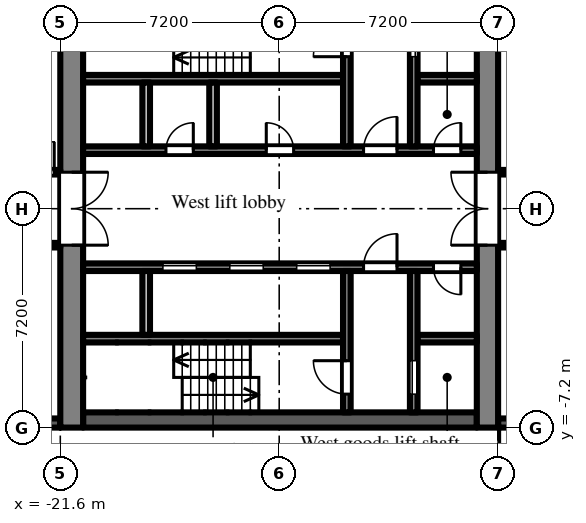
"""IFC4 building model, lengths in metres.
Left out: names, types, materials, properties, quantities, classifications, styles, units other than length and angle.
Written with IfcOpenShell. Run it as: python <this file> out.ifc"""

import sys

from ifc_helpers import new_model, si_unit, direction, frame, frame_2d, origin, place, context, subcontext, project, spatial, rectangle, extrude, element, fill, save


model = new_model("IFC4")
c1 = context("Model", 3, precision=1e-05, world=origin(), true_north=direction((0.0, 1.0)))
c2 = subcontext(c1, "Body", "Model", "MODEL_VIEW")
j1 = project(units=[si_unit("LENGTHUNIT", "METRE"), si_unit("PLANEANGLEUNIT", "RADIAN")], contexts=[c1])
p1 = place(None, origin())
s1 = spatial("IfcSite", under=j1, at=p1, CompositionType="ELEMENT")
p2 = place(p1, origin())
s2 = spatial("IfcBuilding", under=s1, at=p2, CompositionType="ELEMENT")
p3 = place(p2, frame((0.0, 0.0, 59.7)))
s3 = spatial("IfcBuildingStorey", under=s2, at=p3, CompositionType="ELEMENT", Elevation=59.7)
p4 = place(p3, frame((-24.3, -7.05, 0.0), z_axis=(0.0, 0.0, 1.0), x_axis=(1.0, 0.0, 0.0)))
e1 = element("IfcWall", 1, at=p4, inside=s3, PredefinedType="SOLIDWALL", context=c2, shape_type="SweptSolid", body=[
    extrude(rectangle(XDim=2.7, YDim=0.3, at=frame_2d((1.35, 0.0))), origin(), (0.0, 0.0, 1.0), 2.1),
])
p5 = place(p3, frame((-7.2, -7.05, 0.0), z_axis=(0.0, 0.0, 1.0), x_axis=(1.0, 0.0, 0.0)))
e2 = element("IfcWall", 2, at=p5, inside=s3, PredefinedType="SOLIDWALL", context=c2, shape_type="SweptSolid", body=[
    extrude(rectangle(XDim=3.0, YDim=0.3, at=frame_2d((1.5, 0.0))), origin(), (0.0, 0.0, 1.0), 2.55),
])
p6 = place(p3, frame((-7.55, -7.2, 0.0), z_axis=(0.0, 0.0, 1.0), x_axis=(0.0, 1.0, 0.0)))
e3 = element("IfcWall", 3, at=p6, inside=s3, PredefinedType="SHEAR", context=c2, shape_type="SweptSolid", body=[
    extrude(rectangle(XDim=14.4, YDim=0.7, at=frame_2d((7.2, 0.0))), origin(), (0.0, 0.0, 1.0), 2.55),
])
p7 = place(p6, frame((6.0, 0.0, 0.0)))
e4 = element("IfcOpeningElement", 4, at=p7, cuts=e3, PredefinedType="OPENING", context=c2, shape_type="SweptSolid", body=[
    extrude(rectangle(XDim=2.4, YDim=2.2, at=frame_2d((1.2, 1.1))), frame((0.0, 0.36, 0.0), z_axis=(0.0, -1.0, 0.0), x_axis=(1.0, 0.0, 0.0)), (0.0, 0.0, 1.0), 0.72),
])
p8 = place(p3, frame((-21.225, -7.2, 0.0), z_axis=(0.0, 0.0, 1.0), x_axis=(0.0, 1.0, 0.0)))
e5 = element("IfcWall", 5, at=p8, inside=s3, PredefinedType="SHEAR", context=c2, shape_type="SweptSolid", body=[
    extrude(rectangle(XDim=14.4, YDim=0.75, at=frame_2d((7.2, 0.0))), origin(), (0.0, 0.0, 1.0), 2.55),
])
p9 = place(p8, frame((6.0, 0.0, 0.0)))
e6 = element("IfcOpeningElement", 6, at=p9, cuts=e5, PredefinedType="OPENING", context=c2, shape_type="SweptSolid", body=[
    extrude(rectangle(XDim=2.4, YDim=2.2, at=frame_2d((1.2, 1.1))), frame((0.0, 0.385, 0.0), z_axis=(0.0, -1.0, 0.0), x_axis=(1.0, 0.0, 0.0)), (0.0, 0.0, 1.0), 0.77),
])
p10 = place(p3, frame((-7.9, 1.925, 0.0), z_axis=(0.0, 0.0, 1.0), x_axis=(-1.0, 0.0, 0.0)))
e7 = element("IfcWall", 7, at=p10, inside=s3, PredefinedType="SHEAR", context=c2, shape_type="SweptSolid", body=[
    extrude(rectangle(XDim=12.95, YDim=0.25, at=frame_2d((6.475, 0.0))), origin(), (0.0, 0.0, 1.0), 2.55),
])
p11 = place(p10, frame((0.525, 0.0, 0.0)))
e8 = element("IfcOpeningElement", 8, at=p11, cuts=e7, PredefinedType="OPENING", context=c2, shape_type="SweptSolid", body=[
    extrude(rectangle(XDim=0.9, YDim=2.1, at=frame_2d((0.45, 1.05))), frame((0.0, 0.135, 0.0), z_axis=(0.0, -1.0, 0.0), x_axis=(1.0, 0.0, 0.0)), (0.0, 0.0, 1.0), 0.27),
])
p12 = place(p10, frame((2.625, 0.0, 0.0)))
e9 = element("IfcOpeningElement", 9, at=p12, cuts=e7, PredefinedType="OPENING", context=c2, shape_type="SweptSolid", body=[
    extrude(rectangle(XDim=1.1, YDim=2.1, at=frame_2d((0.55, 1.05))), frame((0.0, 0.135, 0.0), z_axis=(0.0, -1.0, 0.0), x_axis=(1.0, 0.0, 0.0)), (0.0, 0.0, 1.0), 0.27),
])
p13 = place(p10, frame((6.025, 0.0, 0.0)))
e10 = element("IfcOpeningElement", 10, at=p13, cuts=e7, PredefinedType="OPENING", context=c2, shape_type="SweptSolid", body=[
    extrude(rectangle(XDim=0.9, YDim=2.1, at=frame_2d((0.45, 1.05))), frame((0.0, 0.135, 0.0), z_axis=(0.0, -1.0, 0.0), x_axis=(1.0, 0.0, 0.0)), (0.0, 0.0, 1.0), 0.27),
])
p14 = place(p10, frame((9.325, 0.0, 0.0)))
e11 = element("IfcOpeningElement", 11, at=p14, cuts=e7, PredefinedType="OPENING", context=c2, shape_type="SweptSolid", body=[
    extrude(rectangle(XDim=0.9, YDim=2.1, at=frame_2d((0.45, 1.05))), frame((0.0, 0.135, 0.0), z_axis=(0.0, -1.0, 0.0), x_axis=(1.0, 0.0, 0.0)), (0.0, 0.0, 1.0), 0.27),
])
p15 = place(p3, frame((-7.9, 4.275, 0.0), z_axis=(0.0, 0.0, 1.0), x_axis=(-1.0, 0.0, 0.0)))
e12 = element("IfcWall", 12, at=p15, inside=s3, PredefinedType="SHEAR", context=c2, shape_type="SweptSolid", body=[
    extrude(rectangle(XDim=1.95, YDim=0.25, at=frame_2d((0.975, 0.0))), origin(), (0.0, 0.0, 1.0), 2.55),
])
p16 = place(p3, frame((-12.3, 4.275, 0.0), z_axis=(0.0, 0.0, 1.0), x_axis=(-1.0, 0.0, 0.0)))
e13 = element("IfcWall", 13, at=p16, inside=s3, PredefinedType="SHEAR", context=c2, shape_type="SweptSolid", body=[
    extrude(rectangle(XDim=8.55, YDim=0.25, at=frame_2d((4.275, 0.0))), origin(), (0.0, 0.0, 1.0), 2.55),
])
p17 = place(p3, frame((-9.975, 2.05, 0.0), z_axis=(0.0, 0.0, 1.0), x_axis=(0.0, 1.0, 0.0)))
e14 = element("IfcWall", 14, at=p17, inside=s3, PredefinedType="SHEAR", context=c2, shape_type="SweptSolid", body=[
    extrude(rectangle(XDim=4.65, YDim=0.25, at=frame_2d((2.325, 0.0))), origin(), (0.0, 0.0, 1.0), 2.55),
])
p18 = place(p17, frame((2.95, 0.0, 0.0)))
e15 = element("IfcOpeningElement", 15, at=p18, cuts=e14, PredefinedType="OPENING", context=c2, shape_type="SweptSolid", body=[
    extrude(rectangle(XDim=1.1, YDim=2.1, at=frame_2d((0.55, 1.05))), frame((0.0, 0.135, 0.0), z_axis=(0.0, -1.0, 0.0), x_axis=(1.0, 0.0, 0.0)), (0.0, 0.0, 1.0), 0.27),
])
p19 = place(p3, frame((-12.175, 2.05, 0.0), z_axis=(0.0, 0.0, 1.0), x_axis=(0.0, 1.0, 0.0)))
e16 = element("IfcWall", 16, at=p19, inside=s3, PredefinedType="SHEAR", context=c2, shape_type="SweptSolid", body=[
    extrude(rectangle(XDim=4.65, YDim=0.25, at=frame_2d((2.325, 0.0))), origin(), (0.0, 0.0, 1.0), 2.55),
])
p20 = place(p19, frame((2.95, 0.0, 0.0)))
e17 = element("IfcOpeningElement", 17, at=p20, cuts=e16, PredefinedType="OPENING", context=c2, shape_type="SweptSolid", body=[
    extrude(rectangle(XDim=1.1, YDim=2.1, at=frame_2d((0.55, 1.05))), frame((0.0, 0.135, 0.0), z_axis=(0.0, -1.0, 0.0), x_axis=(1.0, 0.0, 0.0)), (0.0, 0.0, 1.0), 0.27),
])
for number, where, z_axis, x_axis in (
    (18, (-16.575, 2.05, 0.0), (0.0, 0.0, 1.0), (0.0, 1.0, 0.0)),
    (19, (-18.775, 2.05, 0.0), (0.0, 0.0, 1.0), (0.0, 1.0, 0.0)),
):
    element("IfcWall", number, at=place(p3, frame(where, z_axis=z_axis, x_axis=x_axis)), inside=s3, PredefinedType="PARTITIONING", context=c2, shape_type="SweptSolid", body=[
        extrude(rectangle(XDim=2.1, YDim=0.25, at=frame_2d((1.05, 0.0))), origin(), (0.0, 0.0, 1.0), 2.55),
    ])
p21 = place(p3, frame((-7.9, -6.95, 0.0), z_axis=(0.0, 0.0, 1.0), x_axis=(-1.0, 0.0, 0.0)))
e20 = element("IfcWall", 20, at=p21, inside=s3, PredefinedType="SHEAR", context=c2, shape_type="SweptSolid", body=[
    extrude(rectangle(XDim=12.95, YDim=0.5, at=frame_2d((6.475, 0.0))), origin(), (0.0, 0.0, 1.0), 2.55),
])
p22 = place(p3, frame((-7.9, -1.925, 0.0), z_axis=(0.0, 0.0, 1.0), x_axis=(-1.0, 0.0, 0.0)))
e21 = element("IfcWall", 21, at=p22, inside=s3, PredefinedType="SHEAR", context=c2, shape_type="SweptSolid", body=[
    extrude(rectangle(XDim=12.95, YDim=0.25, at=frame_2d((6.475, 0.0))), origin(), (0.0, 0.0, 1.0), 2.55),
])
p23 = place(p22, frame((4.825, 0.0, 0.0)))
e22 = element("IfcOpeningElement", 22, at=p23, cuts=e21, PredefinedType="OPENING", context=c2, shape_type="SweptSolid", body=[
    extrude(rectangle(XDim=1.1, YDim=2.1, at=frame_2d((0.55, 1.05))), frame((0.0, 0.135, 0.0), z_axis=(0.0, -1.0, 0.0), x_axis=(1.0, 0.0, 0.0)), (0.0, 0.0, 1.0), 0.27),
])
p24 = place(p22, frame((7.025, 0.0, 0.0)))
e23 = element("IfcOpeningElement", 23, at=p24, cuts=e21, PredefinedType="OPENING", context=c2, shape_type="SweptSolid", body=[
    extrude(rectangle(XDim=1.1, YDim=2.1, at=frame_2d((0.55, 1.05))), frame((0.0, 0.135, 0.0), z_axis=(0.0, -1.0, 0.0), x_axis=(1.0, 0.0, 0.0)), (0.0, 0.0, 1.0), 0.27),
])
p25 = place(p22, frame((9.225, 0.0, 0.0)))
e24 = element("IfcOpeningElement", 24, at=p25, cuts=e21, PredefinedType="OPENING", context=c2, shape_type="SweptSolid", body=[
    extrude(rectangle(XDim=1.1, YDim=2.1, at=frame_2d((0.55, 1.05))), frame((0.0, 0.135, 0.0), z_axis=(0.0, -1.0, 0.0), x_axis=(1.0, 0.0, 0.0)), (0.0, 0.0, 1.0), 0.27),
])
p26 = place(p22, frame((0.525, 0.0, 0.0)))
e25 = element("IfcOpeningElement", 25, at=p26, cuts=e21, PredefinedType="OPENING", context=c2, shape_type="SweptSolid", body=[
    extrude(rectangle(XDim=0.9, YDim=2.1, at=frame_2d((0.45, 1.05))), frame((0.0, 0.135, 0.0), z_axis=(0.0, -1.0, 0.0), x_axis=(1.0, 0.0, 0.0)), (0.0, 0.0, 1.0), 0.27),
])
p27 = place(p22, frame((2.625, 0.0, 0.0)))
e26 = element("IfcOpeningElement", 26, at=p27, cuts=e21, PredefinedType="OPENING", context=c2, shape_type="SweptSolid", body=[
    extrude(rectangle(XDim=1.1, YDim=2.1, at=frame_2d((0.55, 1.05))), frame((0.0, 0.135, 0.0), z_axis=(0.0, -1.0, 0.0), x_axis=(1.0, 0.0, 0.0)), (0.0, 0.0, 1.0), 0.27),
])
p28 = place(p3, frame((-7.9, -4.275, 0.0), z_axis=(0.0, 0.0, 1.0), x_axis=(-1.0, 0.0, 0.0)))
e27 = element("IfcWall", 27, at=p28, inside=s3, PredefinedType="SHEAR", context=c2, shape_type="SweptSolid", body=[
    extrude(rectangle(XDim=1.95, YDim=0.25, at=frame_2d((0.975, 0.0))), origin(), (0.0, 0.0, 1.0), 2.55),
])
p29 = place(p3, frame((-12.3, -4.275, 0.0), z_axis=(0.0, 0.0, 1.0), x_axis=(-1.0, 0.0, 0.0)))
e28 = element("IfcWall", 28, at=p29, inside=s3, PredefinedType="SHEAR", context=c2, shape_type="SweptSolid", body=[
    extrude(rectangle(XDim=8.55, YDim=0.25, at=frame_2d((4.275, 0.0))), origin(), (0.0, 0.0, 1.0), 2.55),
])
p30 = place(p3, frame((-9.975, -2.05, 0.0), z_axis=(0.0, 0.0, 1.0), x_axis=(0.0, -1.0, 0.0)))
e29 = element("IfcWall", 29, at=p30, inside=s3, PredefinedType="SHEAR", context=c2, shape_type="SweptSolid", body=[
    extrude(rectangle(XDim=4.65, YDim=0.25, at=frame_2d((2.325, 0.0))), origin(), (0.0, 0.0, 1.0), 2.55),
])
p31 = place(p30, frame((2.95, 0.0, 0.0)))
e30 = element("IfcOpeningElement", 30, at=p31, cuts=e29, PredefinedType="OPENING", context=c2, shape_type="SweptSolid", body=[
    extrude(rectangle(XDim=1.1, YDim=2.1, at=frame_2d((0.55, 1.05))), frame((0.0, 0.135, 0.0), z_axis=(0.0, -1.0, 0.0), x_axis=(1.0, 0.0, 0.0)), (0.0, 0.0, 1.0), 0.27),
])
p32 = place(p3, frame((-12.175, -2.05, 0.0), z_axis=(0.0, 0.0, 1.0), x_axis=(0.0, -1.0, 0.0)))
e31 = element("IfcWall", 31, at=p32, inside=s3, PredefinedType="SHEAR", context=c2, shape_type="SweptSolid", body=[
    extrude(rectangle(XDim=4.65, YDim=0.25, at=frame_2d((2.325, 0.0))), origin(), (0.0, 0.0, 1.0), 2.55),
])
p33 = place(p32, frame((2.95, 0.0, 0.0)))
e32 = element("IfcOpeningElement", 32, at=p33, cuts=e31, PredefinedType="OPENING", context=c2, shape_type="SweptSolid", body=[
    extrude(rectangle(XDim=1.1, YDim=2.1, at=frame_2d((0.55, 1.05))), frame((0.0, 0.135, 0.0), z_axis=(0.0, -1.0, 0.0), x_axis=(1.0, 0.0, 0.0)), (0.0, 0.0, 1.0), 0.27),
])
p34 = place(p3, frame((-18.775, -2.05, 0.0), z_axis=(0.0, 0.0, 1.0), x_axis=(0.0, -1.0, 0.0)))
e33 = element("IfcWall", 33, at=p34, inside=s3, PredefinedType="PARTITIONING", context=c2, shape_type="SweptSolid", body=[
    extrude(rectangle(XDim=2.1, YDim=0.25, at=frame_2d((1.05, 0.0))), origin(), (0.0, 0.0, 1.0), 2.55),
])
p35 = place(p3, frame((-36.5, -1.2, 0.0), z_axis=(0.0, 0.0, 1.0), x_axis=(1.0, 0.0, 0.0)))
e34 = element("IfcWall", 34, at=p35, inside=s3, PredefinedType="PARTITIONING", context=c2, shape_type="SweptSolid", body=[
    extrude(rectangle(XDim=14.9, YDim=0.15, at=frame_2d((7.45, 0.0))), origin(), (0.0, 0.0, 1.0), 2.55),
])
p36 = place(p35, frame((10.4, 0.0, 0.0)))
e35 = element("IfcOpeningElement", 35, at=p36, cuts=e34, PredefinedType="OPENING", context=c2, shape_type="SweptSolid", body=[
    extrude(rectangle(XDim=1.8, YDim=2.1, at=frame_2d((0.9, 1.05))), frame((0.0, 0.085, 0.0), z_axis=(0.0, -1.0, 0.0), x_axis=(1.0, 0.0, 0.0)), (0.0, 0.0, 1.0), 0.17),
])
p37 = place(p35, frame((6.35, 0.0, 0.0)))
e36 = element("IfcOpeningElement", 36, at=p37, cuts=e34, PredefinedType="OPENING", context=c2, shape_type="SweptSolid", body=[
    extrude(rectangle(XDim=0.9, YDim=2.1, at=frame_2d((0.45, 1.05))), frame((0.0, 0.085, 0.0), z_axis=(0.0, -1.0, 0.0), x_axis=(1.0, 0.0, 0.0)), (0.0, 0.0, 1.0), 0.17),
])
p38 = place(p35, frame((4.55, 0.0, 0.0)))
e37 = element("IfcOpeningElement", 37, at=p38, cuts=e34, PredefinedType="OPENING", context=c2, shape_type="SweptSolid", body=[
    extrude(rectangle(XDim=0.9, YDim=2.1, at=frame_2d((0.45, 1.05))), frame((0.0, 0.085, 0.0), z_axis=(0.0, -1.0, 0.0), x_axis=(1.0, 0.0, 0.0)), (0.0, 0.0, 1.0), 0.17),
])
p39 = place(p35, frame((1.15, 0.0, 0.0)))
e38 = element("IfcOpeningElement", 38, at=p39, cuts=e34, PredefinedType="OPENING", context=c2, shape_type="SweptSolid", body=[
    extrude(rectangle(XDim=1.8, YDim=2.1, at=frame_2d((0.9, 1.05))), frame((0.0, 0.085, 0.0), z_axis=(0.0, -1.0, 0.0), x_axis=(1.0, 0.0, 0.0)), (0.0, 0.0, 1.0), 0.17),
])
p40 = place(p3, frame((-36.5, 1.2, 0.0), z_axis=(0.0, 0.0, 1.0), x_axis=(1.0, 0.0, 0.0)))
e39 = element("IfcWall", 39, at=p40, inside=s3, PredefinedType="PARTITIONING", context=c2, shape_type="SweptSolid", body=[
    extrude(rectangle(XDim=14.9, YDim=0.15, at=frame_2d((7.45, 0.0))), origin(), (0.0, 0.0, 1.0), 2.55),
])
p41 = place(p40, frame((13.7, 0.0, 0.0)))
e40 = element("IfcOpeningElement", 40, at=p41, cuts=e39, PredefinedType="OPENING", context=c2, shape_type="SweptSolid", body=[
    extrude(rectangle(XDim=1.0, YDim=2.1, at=frame_2d((0.5, 1.05))), frame((0.0, 0.085, 0.0), z_axis=(0.0, -1.0, 0.0), x_axis=(1.0, 0.0, 0.0)), (0.0, 0.0, 1.0), 0.17),
])
p42 = place(p40, frame((8.19, 0.0, 0.0)))
e41 = element("IfcOpeningElement", 41, at=p42, cuts=e39, PredefinedType="OPENING", context=c2, shape_type="SweptSolid", body=[
    extrude(rectangle(XDim=1.0, YDim=2.1, at=frame_2d((0.5, 1.05))), frame((0.0, 0.085, 0.0), z_axis=(0.0, -1.0, 0.0), x_axis=(1.0, 0.0, 0.0)), (0.0, 0.0, 1.0), 0.17),
])
p43 = place(p40, frame((1.15, 0.0, 0.0)))
e42 = element("IfcOpeningElement", 42, at=p43, cuts=e39, PredefinedType="OPENING", context=c2, shape_type="SweptSolid", body=[
    extrude(rectangle(XDim=1.8, YDim=2.1, at=frame_2d((0.9, 1.05))), frame((0.0, 0.085, 0.0), z_axis=(0.0, -1.0, 0.0), x_axis=(1.0, 0.0, 0.0)), (0.0, 0.0, 1.0), 0.17),
])
p44 = place(p3, frame((-7.2, -1.2, 0.0), z_axis=(0.0, 0.0, 1.0), x_axis=(1.0, 0.0, 0.0)))
e43 = element("IfcWall", 43, at=p44, inside=s3, PredefinedType="PARTITIONING", context=c2, shape_type="SweptSolid", body=[
    extrude(rectangle(XDim=6.075, YDim=0.15, at=frame_2d((3.038, 0.0))), origin(), (0.0, 0.0, 1.0), 2.55),
])
p45 = place(p44, frame((2.55, 0.0, 0.0)))
e44 = element("IfcOpeningElement", 44, at=p45, cuts=e43, PredefinedType="OPENING", context=c2, shape_type="SweptSolid", body=[
    extrude(rectangle(XDim=0.9, YDim=2.1, at=frame_2d((0.45, 1.05))), frame((0.0, 0.085, 0.0), z_axis=(0.0, -1.0, 0.0), x_axis=(1.0, 0.0, 0.0)), (0.0, 0.0, 1.0), 0.17),
])
p46 = place(p44, frame((0.55, 0.0, 0.0)))
e45 = element("IfcOpeningElement", 45, at=p46, cuts=e43, PredefinedType="OPENING", context=c2, shape_type="SweptSolid", body=[
    extrude(rectangle(XDim=0.9, YDim=2.1, at=frame_2d((0.45, 1.05))), frame((0.0, 0.085, 0.0), z_axis=(0.0, -1.0, 0.0), x_axis=(1.0, 0.0, 0.0)), (0.0, 0.0, 1.0), 0.17),
])
p47 = place(p3, frame((-7.2, 1.2, 0.0), z_axis=(0.0, 0.0, 1.0), x_axis=(1.0, 0.0, 0.0)))
e46 = element("IfcWall", 46, at=p47, inside=s3, PredefinedType="PARTITIONING", context=c2, shape_type="SweptSolid", body=[
    extrude(rectangle(XDim=6.075, YDim=0.15, at=frame_2d((3.038, 0.0))), origin(), (0.0, 0.0, 1.0), 2.55),
])
p48 = place(p47, frame((2.55, 0.0, 0.0)))
e47 = element("IfcOpeningElement", 47, at=p48, cuts=e46, PredefinedType="OPENING", context=c2, shape_type="SweptSolid", body=[
    extrude(rectangle(XDim=0.9, YDim=2.1, at=frame_2d((0.45, 1.05))), frame((0.0, 0.085, 0.0), z_axis=(0.0, -1.0, 0.0), x_axis=(1.0, 0.0, 0.0)), (0.0, 0.0, 1.0), 0.17),
])
p49 = place(p47, frame((0.55, 0.0, 0.0)))
e48 = element("IfcOpeningElement", 48, at=p49, cuts=e46, PredefinedType="OPENING", context=c2, shape_type="SweptSolid", body=[
    extrude(rectangle(XDim=0.9, YDim=2.1, at=frame_2d((0.45, 1.05))), frame((0.0, 0.085, 0.0), z_axis=(0.0, -1.0, 0.0), x_axis=(1.0, 0.0, 0.0)), (0.0, 0.0, 1.0), 0.17),
])
p50 = place(p23, origin())
e49 = element("IfcDoor", 49, at=p50, inside=s3, OperationType="SLIDING_TO_LEFT", PredefinedType="DOOR", context=c2, shape_type="SweptSolid", body=[
    extrude(rectangle(XDim=1.1, YDim=2.1, at=frame_2d((0.55, 1.05))), frame((0.0, 0.025, 0.0), z_axis=(0.0, -1.0, 0.0), x_axis=(1.0, 0.0, 0.0)), (0.0, 0.0, 1.0), 0.05),
])
fill(e22, e49)
p51 = place(p24, origin())
e50 = element("IfcDoor", 50, at=p51, inside=s3, OperationType="SLIDING_TO_LEFT", PredefinedType="DOOR", context=c2, shape_type="SweptSolid", body=[
    extrude(rectangle(XDim=1.1, YDim=2.1, at=frame_2d((0.55, 1.05))), frame((0.0, 0.025, 0.0), z_axis=(0.0, -1.0, 0.0), x_axis=(1.0, 0.0, 0.0)), (0.0, 0.0, 1.0), 0.05),
])
fill(e23, e50)
p52 = place(p25, origin())
e51 = element("IfcDoor", 51, at=p52, inside=s3, OperationType="SLIDING_TO_LEFT", PredefinedType="DOOR", context=c2, shape_type="SweptSolid", body=[
    extrude(rectangle(XDim=1.1, YDim=2.1, at=frame_2d((0.55, 1.05))), frame((0.0, 0.025, 0.0), z_axis=(0.0, -1.0, 0.0), x_axis=(1.0, 0.0, 0.0)), (0.0, 0.0, 1.0), 0.05),
])
fill(e24, e51)
p53 = place(p18, origin())
e52 = element("IfcDoor", 52, at=p53, inside=s3, OperationType="SLIDING_TO_LEFT", PredefinedType="DOOR", context=c2, shape_type="SweptSolid", body=[
    extrude(rectangle(XDim=1.1, YDim=2.1, at=frame_2d((0.55, 1.05))), frame((0.0, 0.025, 0.0), z_axis=(0.0, -1.0, 0.0), x_axis=(1.0, 0.0, 0.0)), (0.0, 0.0, 1.0), 0.05),
])
fill(e15, e52)
p54 = place(p31, origin())
e53 = element("IfcDoor", 53, at=p54, inside=s3, OperationType="SLIDING_TO_LEFT", PredefinedType="DOOR", context=c2, shape_type="SweptSolid", body=[
    extrude(rectangle(XDim=1.1, YDim=2.1, at=frame_2d((0.55, 1.05))), frame((0.0, 0.025, 0.0), z_axis=(0.0, -1.0, 0.0), x_axis=(1.0, 0.0, 0.0)), (0.0, 0.0, 1.0), 0.05),
])
fill(e30, e53)
p55 = place(p20, origin())
e54 = element("IfcDoor", 54, at=p55, inside=s3, OperationType="SINGLE_SWING_LEFT", PredefinedType="DOOR", context=c2, shape_type="SweptSolid", body=[
    extrude(rectangle(XDim=1.1, YDim=2.1, at=frame_2d((0.55, 1.05))), frame((0.0, 0.025, 0.0), z_axis=(0.0, -1.0, 0.0), x_axis=(1.0, 0.0, 0.0)), (0.0, 0.0, 1.0), 0.05),
])
fill(e17, e54)
p56 = place(p33, frame((1.1, 0.0, 0.0), z_axis=(0.0, 0.0, 1.0), x_axis=(-1.0, 0.0, 0.0)))
e55 = element("IfcDoor", 55, at=p56, inside=s3, OperationType="SINGLE_SWING_RIGHT", PredefinedType="DOOR", context=c2, shape_type="SweptSolid", body=[
    extrude(rectangle(XDim=1.1, YDim=2.1, at=frame_2d((0.55, 1.05))), frame((0.0, 0.025, 0.0), z_axis=(0.0, -1.0, 0.0), x_axis=(1.0, 0.0, 0.0)), (0.0, 0.0, 1.0), 0.05),
])
fill(e32, e55)
p57 = place(p11, frame((0.9, 0.0, 0.0), z_axis=(0.0, 0.0, 1.0), x_axis=(-1.0, 0.0, 0.0)))
e56 = element("IfcDoor", 56, at=p57, inside=s3, OperationType="SINGLE_SWING_RIGHT", PredefinedType="DOOR", context=c2, shape_type="SweptSolid", body=[
    extrude(rectangle(XDim=0.9, YDim=2.1, at=frame_2d((0.45, 1.05))), frame((0.0, 0.025, 0.0), z_axis=(0.0, -1.0, 0.0), x_axis=(1.0, 0.0, 0.0)), (0.0, 0.0, 1.0), 0.05),
])
fill(e8, e56)
p58 = place(p26, origin())
e57 = element("IfcDoor", 57, at=p58, inside=s3, OperationType="SINGLE_SWING_LEFT", PredefinedType="DOOR", context=c2, shape_type="SweptSolid", body=[
    extrude(rectangle(XDim=0.9, YDim=2.1, at=frame_2d((0.45, 1.05))), frame((0.0, 0.025, 0.0), z_axis=(0.0, -1.0, 0.0), x_axis=(1.0, 0.0, 0.0)), (0.0, 0.0, 1.0), 0.05),
])
fill(e25, e57)
p59 = place(p12, frame((1.1, 0.0, 0.0), z_axis=(0.0, 0.0, 1.0), x_axis=(-1.0, 0.0, 0.0)))
e58 = element("IfcDoor", 58, at=p59, inside=s3, OperationType="SINGLE_SWING_RIGHT", PredefinedType="DOOR", context=c2, shape_type="SweptSolid", body=[
    extrude(rectangle(XDim=1.1, YDim=2.1, at=frame_2d((0.55, 1.05))), frame((0.0, 0.025, 0.0), z_axis=(0.0, -1.0, 0.0), x_axis=(1.0, 0.0, 0.0)), (0.0, 0.0, 1.0), 0.05),
])
fill(e9, e58)
p60 = place(p27, frame((1.1, 0.0, 0.0), z_axis=(0.0, 0.0, 1.0), x_axis=(-1.0, 0.0, 0.0)))
e59 = element("IfcDoor", 59, at=p60, inside=s3, OperationType="SINGLE_SWING_RIGHT", PredefinedType="DOOR", context=c2, shape_type="SweptSolid", body=[
    extrude(rectangle(XDim=1.1, YDim=2.1, at=frame_2d((0.55, 1.05))), frame((0.0, 0.025, 0.0), z_axis=(0.0, -1.0, 0.0), x_axis=(1.0, 0.0, 0.0)), (0.0, 0.0, 1.0), 0.05),
])
fill(e26, e59)
p61 = place(p7, origin())
e60 = element("IfcDoor", 60, at=p61, inside=s3, OperationType="DOUBLE_DOOR_DOUBLE_SWING", PredefinedType="DOOR", context=c2, shape_type="SweptSolid", body=[
    extrude(rectangle(XDim=2.4, YDim=2.2, at=frame_2d((1.2, 1.1))), frame((0.0, 0.025, 0.0), z_axis=(0.0, -1.0, 0.0), x_axis=(1.0, 0.0, 0.0)), (0.0, 0.0, 1.0), 0.05),
])
fill(e4, e60)
p62 = place(p9, frame((2.4, 0.0, 0.0), z_axis=(0.0, 0.0, 1.0), x_axis=(-1.0, 0.0, 0.0)))
e61 = element("IfcDoor", 61, at=p62, inside=s3, OperationType="DOUBLE_DOOR_DOUBLE_SWING", PredefinedType="DOOR", context=c2, shape_type="SweptSolid", body=[
    extrude(rectangle(XDim=2.4, YDim=2.2, at=frame_2d((1.2, 1.1))), frame((0.0, 0.025, 0.0), z_axis=(0.0, -1.0, 0.0), x_axis=(1.0, 0.0, 0.0)), (0.0, 0.0, 1.0), 0.05),
])
fill(e6, e61)
p63 = place(p13, frame((0.9, 0.0, 0.0), z_axis=(0.0, 0.0, 1.0), x_axis=(-1.0, 0.0, 0.0)))
e62 = element("IfcDoor", 62, at=p63, inside=s3, OperationType="SINGLE_SWING_LEFT", PredefinedType="DOOR", context=c2, shape_type="SweptSolid", body=[
    extrude(rectangle(XDim=0.9, YDim=2.1, at=frame_2d((0.45, 1.05))), frame((0.0, 0.025, 0.0), z_axis=(0.0, -1.0, 0.0), x_axis=(1.0, 0.0, 0.0)), (0.0, 0.0, 1.0), 0.05),
])
fill(e10, e62)
p64 = place(p14, frame((0.9, 0.0, 0.0), z_axis=(0.0, 0.0, 1.0), x_axis=(-1.0, 0.0, 0.0)))
e63 = element("IfcDoor", 63, at=p64, inside=s3, OperationType="SINGLE_SWING_RIGHT", PredefinedType="DOOR", context=c2, shape_type="SweptSolid", body=[
    extrude(rectangle(XDim=0.9, YDim=2.1, at=frame_2d((0.45, 1.05))), frame((0.0, 0.025, 0.0), z_axis=(0.0, -1.0, 0.0), x_axis=(1.0, 0.0, 0.0)), (0.0, 0.0, 1.0), 0.05),
])
fill(e11, e63)
p65 = place(p41, origin())
e64 = element("IfcDoor", 64, at=p65, inside=s3, OperationType="SINGLE_SWING_RIGHT", PredefinedType="DOOR", context=c2, shape_type="SweptSolid", body=[
    extrude(rectangle(XDim=1.0, YDim=2.1, at=frame_2d((0.5, 1.05))), frame((0.0, 0.025, 0.0), z_axis=(0.0, -1.0, 0.0), x_axis=(1.0, 0.0, 0.0)), (0.0, 0.0, 1.0), 0.05),
])
fill(e40, e64)
save(model, sys.argv[1])
